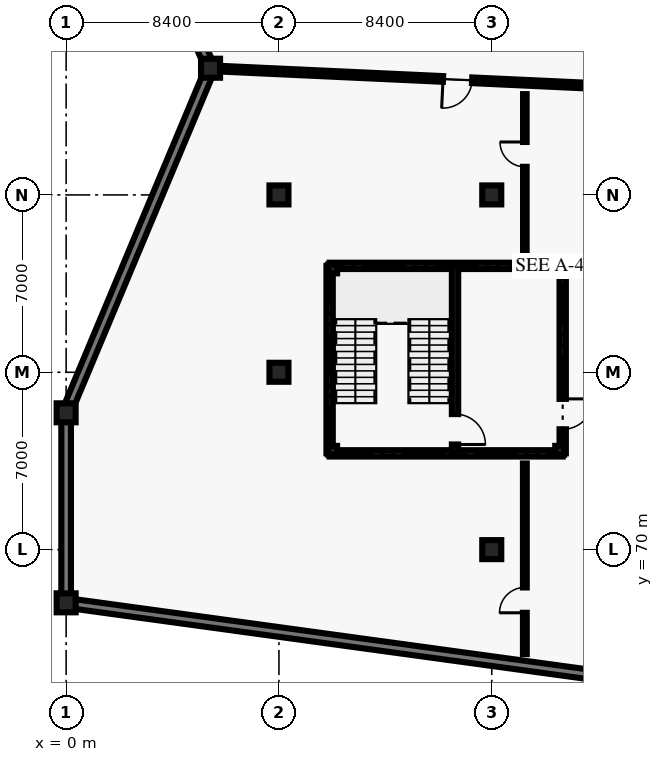
"""IFC4 building model, lengths in metres.
Left out: names, types, materials, properties, quantities, classifications, styles, units other than length and angle.
Written with IfcOpenShell. Run it as: python <this file> out.ifc"""

import sys

from ifc_helpers import new_model, si_unit, direction, frame, frame_2d, origin, origin_2d, place, context, subcontext, project, spatial, rectangle, i_section, extrude, element, fill, save


model = new_model("IFC4")
c1 = context("Model", 3, precision=1e-05, world=origin(), true_north=direction((0.0, 1.0)))
c2 = subcontext(c1, "Body", "Model", "MODEL_VIEW")
j1 = project(units=[si_unit("LENGTHUNIT", "METRE"), si_unit("PLANEANGLEUNIT", "RADIAN")], contexts=[c1])
p1 = place(None, origin())
s1 = spatial("IfcSite", under=j1, at=p1, CompositionType="ELEMENT")
p2 = place(p1, origin())
s2 = spatial("IfcBuilding", under=s1, at=p2, CompositionType="ELEMENT")
p3 = place(p2, frame((0.0, 0.0, -4.5)))
s3 = spatial("IfcBuildingStorey", under=s2, at=p3, CompositionType="ELEMENT", Elevation=-4.5)
for number, where, z_axis, x_axis in (
    (1, (0.0, 67.9, 0.0), (0.0, 0.0, 1.0), (1.0, 0.0, 0.0)),
    (2, (0.0, 75.4, 0.0), (0.0, 0.0, 1.0), (1.0, 0.0, 0.0)),
    (3, (5.7, 89.0, 0.0), (0.0, 0.0, 1.0), (1.0, 0.0, 0.0)),
    (4, (8.4, 77.0, 0.0), (0.0, 0.0, 1.0), (1.0, 0.0, 0.0)),
    (5, (8.4, 84.0, 0.0), (0.0, 0.0, 1.0), (1.0, 0.0, 0.0)),
    (6, (16.8, 70.0, 0.0), (0.0, 0.0, 1.0), (1.0, 0.0, 0.0)),
    (7, (16.8, 84.0, 0.0), (0.0, 0.0, 1.0), (1.0, 0.0, 0.0)),
):
    element("IfcColumn", number, at=place(p3, frame(where, z_axis=z_axis, x_axis=x_axis)), inside=s3, PredefinedType="COLUMN", context=c2, shape_type="SweptSolid", body=[
        extrude(rectangle(XDim=0.75, YDim=0.75, at=origin_2d()), origin(), (0.0, 0.0, 1.0), 4.5),
    ])
for number, where, z_axis, x_axis in (
    (8, (10.52, 73.92, 0.0), (0.0, 0.0, 1.0), (1.0, 0.0, 0.0)),
    (9, (19.48, 73.92, 0.0), (0.0, 0.0, 1.0), (1.0, 0.0, 0.0)),
    (10, (19.48, 81.08, 0.0), (0.0, 0.0, 1.0), (1.0, 0.0, 0.0)),
    (11, (10.52, 81.08, 0.0), (0.0, 0.0, 1.0), (1.0, 0.0, 0.0)),
):
    element("IfcColumn", number, at=place(p3, frame(where, z_axis=z_axis, x_axis=x_axis)), inside=s3, PredefinedType="COLUMN", context=c2, shape_type="SweptSolid", body=[
        extrude(i_section(OverallWidth=0.35, OverallDepth=0.35, WebThickness=0.02, FlangeThickness=0.028, at=origin_2d()), origin(), (0.0, 0.0, 1.0), 4.5),
    ])
p4 = place(p3, frame((0.0, 75.4, 0.0), z_axis=(0.0, 0.0, 1.0), x_axis=(0.0, -1.0, 0.0)))
e12 = element("IfcWall", 12, at=p4, inside=s3, PredefinedType="USERDEFINED", context=c2, shape_type="SweptSolid", body=[
    extrude(rectangle(XDim=7.5, YDim=0.38, at=frame_2d((3.75, 0.0))), origin(), (0.0, 0.0, 1.0), 4.14),
])
p5 = place(p3, frame((0.0, 67.9, 0.0), z_axis=(0.0, 0.0, 1.0), x_axis=(0.990762647393, -0.135607435379, 0.0)))
e13 = element("IfcWall", 13, at=p5, inside=s3, PredefinedType="USERDEFINED", context=c2, shape_type="SweptSolid", body=[
    extrude(rectangle(XDim=26.496, YDim=0.38, at=frame_2d((13.248, 0.0))), origin(), (0.0, 0.0, 1.0), 4.14),
])
p6 = place(p3, frame((5.681, 88.954, 0.0), z_axis=(0.0, 0.0, 1.0), x_axis=(-0.386546655602, -0.922269853699, 0.0)))
e14 = element("IfcWall", 14, at=p6, inside=s3, PredefinedType="USERDEFINED", context=c2, shape_type="SweptSolid", body=[
    extrude(rectangle(XDim=14.697, YDim=0.38, at=frame_2d((7.348, 0.0))), origin(), (0.0, 0.0, 1.0), 4.14),
])
p7 = place(p3, frame((0.0, 101.9, 0.0), z_axis=(0.0, 0.0, 1.0), x_axis=(0.404179059324, -0.914679882803, 0.0)))
e15 = element("IfcWall", 15, at=p7, inside=s3, PredefinedType="USERDEFINED", context=c2, shape_type="SweptSolid", body=[
    extrude(rectangle(XDim=14.053, YDim=0.38, at=frame_2d((7.026, 0.0))), origin(), (0.0, 0.0, 1.0), 4.14),
])
p8 = place(p3, frame((25.2, 88.101, 0.0), z_axis=(0.0, 0.0, 1.0), x_axis=(-0.998939142773, 0.046049853812, 0.0)))
e16 = element("IfcWall", 16, at=p8, inside=s3, PredefinedType="SOLIDWALL", context=c2, shape_type="SweptSolid", body=[
    extrude(rectangle(XDim=19.521, YDim=0.225, at=frame_2d((9.76, 0.0))), origin(), (0.0, 0.0, 1.0), 4.14),
])
p9 = place(p8, frame((9.185, 0.0, 0.0)))
e17 = element("IfcOpeningElement", 17, at=p9, cuts=e16, PredefinedType="OPENING", context=c2, shape_type="SweptSolid", body=[
    extrude(rectangle(XDim=1.15, YDim=2.2, at=frame_2d((0.575, 1.1))), frame((0.0, 0.123, 0.0), z_axis=(0.0, -1.0, 0.0), x_axis=(1.0, 0.0, 0.0)), (0.0, 0.0, 1.0), 0.245),
])
p10 = place(p3, frame((18.106, 65.876, 0.0), z_axis=(0.0, 0.0, 1.0), x_axis=(0.0, 1.0, 0.0)))
e18 = element("IfcWall", 18, at=p10, inside=s3, PredefinedType="PARTITIONING", context=c2, shape_type="SweptSolid", body=[
    extrude(rectangle(XDim=7.524, YDim=0.15, at=frame_2d((3.762, 0.0))), origin(), (0.0, 0.0, 1.0), 3.02),
])
p11 = place(p10, frame((1.631, 0.0, 0.0)))
e19 = element("IfcOpeningElement", 19, at=p11, cuts=e18, PredefinedType="OPENING", context=c2, shape_type="SweptSolid", body=[
    extrude(rectangle(XDim=1.0, YDim=2.15, at=frame_2d((0.5, 1.075))), frame((0.0, 0.085, 0.0), z_axis=(0.0, -1.0, 0.0), x_axis=(1.0, 0.0, 0.0)), (0.0, 0.0, 1.0), 0.17),
])
p12 = place(p3, frame((18.106, 81.6, 0.0), z_axis=(0.0, 0.0, 1.0), x_axis=(0.0, 1.0, 0.0)))
e20 = element("IfcWall", 20, at=p12, inside=s3, PredefinedType="PARTITIONING", context=c2, shape_type="SweptSolid", body=[
    extrude(rectangle(XDim=6.378, YDim=0.14, at=frame_2d((3.189, 0.0))), origin(), (0.0, 0.0, 1.0), 3.02),
])
p13 = place(p12, frame((3.509, 0.0, 0.0)))
e21 = element("IfcOpeningElement", 21, at=p13, cuts=e20, PredefinedType="OPENING", context=c2, shape_type="SweptSolid", body=[
    extrude(rectangle(XDim=0.98, YDim=2.15, at=frame_2d((0.49, 1.075))), frame((0.0, 0.08, 0.0), z_axis=(0.0, -1.0, 0.0), x_axis=(1.0, 0.0, 0.0)), (0.0, 0.0, 1.0), 0.16),
])
p14 = place(p3, frame((10.4, 73.8, 0.0), z_axis=(0.0, 0.0, 1.0), x_axis=(0.0, 1.0, 0.0)))
e22 = element("IfcWall", 22, at=p14, inside=s3, PredefinedType="SHEAR", context=c2, shape_type="SweptSolid", body=[
    extrude(rectangle(XDim=7.4, YDim=0.25, at=frame_2d((3.7, 0.0))), origin(), (0.0, 0.0, 1.0), 4.14),
])
for number, where, z_axis, x_axis in (
    (23, (10.4, 81.2, 0.0), (0.0, 0.0, 1.0), (1.0, 0.0, 0.0)),
    (24, (19.6, 73.8, 0.0), (0.0, 0.0, 1.0), (-1.0, 0.0, 0.0)),
):
    element("IfcWall", number, at=place(p3, frame(where, z_axis=z_axis, x_axis=x_axis)), inside=s3, PredefinedType="SHEAR", context=c2, shape_type="SweptSolid", body=[
        extrude(rectangle(XDim=9.2, YDim=0.25, at=frame_2d((4.6, 0.0))), origin(), (0.0, 0.0, 1.0), 4.14),
    ])
p15 = place(p3, frame((19.6, 81.2, 0.0), z_axis=(0.0, 0.0, 1.0), x_axis=(0.0, -1.0, 0.0)))
e25 = element("IfcWall", 25, at=p15, inside=s3, PredefinedType="SHEAR", context=c2, shape_type="SweptSolid", body=[
    extrude(rectangle(XDim=7.4, YDim=0.25, at=frame_2d((3.7, 0.0))), origin(), (0.0, 0.0, 1.0), 4.14),
])
p16 = place(p15, frame((5.25, 0.0, 0.0)))
e26 = element("IfcOpeningElement", 26, at=p16, cuts=e25, PredefinedType="OPENING", context=c2, shape_type="SweptSolid", body=[
    extrude(rectangle(XDim=1.2, YDim=2.2, at=frame_2d((0.6, 1.1))), frame((0.0, 0.135, 0.0), z_axis=(0.0, -1.0, 0.0), x_axis=(1.0, 0.0, 0.0)), (0.0, 0.0, 1.0), 0.27),
])
p17 = place(p3, frame((15.35, 81.2, 0.0), z_axis=(0.0, 0.0, 1.0), x_axis=(0.0, -1.0, 0.0)))
e27 = element("IfcWall", 27, at=p17, inside=s3, PredefinedType="SHEAR", context=c2, shape_type="SweptSolid", body=[
    extrude(rectangle(XDim=7.4, YDim=0.25, at=frame_2d((3.7, 0.0))), origin(), (0.0, 0.0, 1.0), 4.14),
])
p18 = place(p17, frame((5.85, 0.0, 0.0)))
e28 = element("IfcOpeningElement", 28, at=p18, cuts=e27, PredefinedType="OPENING", context=c2, shape_type="SweptSolid", body=[
    extrude(rectangle(XDim=1.2, YDim=2.2, at=frame_2d((0.6, 1.1))), frame((0.0, 0.135, 0.0), z_axis=(0.0, -1.0, 0.0), x_axis=(1.0, 0.0, 0.0)), (0.0, 0.0, 1.0), 0.27),
])
p19 = place(p9, origin())
e29 = element("IfcDoor", 29, at=p19, inside=s3, OperationType="SINGLE_SWING_RIGHT", PredefinedType="DOOR", context=c2, shape_type="SweptSolid", body=[
    extrude(rectangle(XDim=1.15, YDim=2.2, at=frame_2d((0.575, 1.1))), frame((0.0, 0.025, 0.0), z_axis=(0.0, -1.0, 0.0), x_axis=(1.0, 0.0, 0.0)), (0.0, 0.0, 1.0), 0.05),
])
fill(e17, e29)
p20 = place(p11, origin())
e30 = element("IfcDoor", 30, at=p20, inside=s3, OperationType="SINGLE_SWING_LEFT", PredefinedType="DOOR", context=c2, shape_type="SweptSolid", body=[
    extrude(rectangle(XDim=1.0, YDim=2.15, at=frame_2d((0.5, 1.075))), frame((0.0, 0.025, 0.0), z_axis=(0.0, -1.0, 0.0), x_axis=(1.0, 0.0, 0.0)), (0.0, 0.0, 1.0), 0.05),
])
fill(e19, e30)
p21 = place(p13, origin())
e31 = element("IfcDoor", 31, at=p21, inside=s3, OperationType="SINGLE_SWING_RIGHT", PredefinedType="DOOR", context=c2, shape_type="SweptSolid", body=[
    extrude(rectangle(XDim=0.98, YDim=2.15, at=frame_2d((0.49, 1.075))), frame((0.0, 0.025, 0.0), z_axis=(0.0, -1.0, 0.0), x_axis=(1.0, 0.0, 0.0)), (0.0, 0.0, 1.0), 0.05),
])
fill(e21, e31)
p22 = place(p16, origin())
e32 = element("IfcDoor", 32, at=p22, inside=s3, OperationType="SINGLE_SWING_LEFT", PredefinedType="DOOR", context=c2, shape_type="SweptSolid", body=[
    extrude(rectangle(XDim=1.2, YDim=2.2, at=frame_2d((0.6, 1.1))), frame((0.0, 0.025, 0.0), z_axis=(0.0, -1.0, 0.0), x_axis=(1.0, 0.0, 0.0)), (0.0, 0.0, 1.0), 0.05),
])
fill(e26, e32)
p23 = place(p18, origin())
e33 = element("IfcDoor", 33, at=p23, inside=s3, OperationType="SINGLE_SWING_RIGHT", PredefinedType="DOOR", context=c2, shape_type="SweptSolid", body=[
    extrude(rectangle(XDim=1.2, YDim=2.2, at=frame_2d((0.6, 1.1))), frame((0.0, 0.025, 0.0), z_axis=(0.0, -1.0, 0.0), x_axis=(1.0, 0.0, 0.0)), (0.0, 0.0, 1.0), 0.05),
])
fill(e28, e33)
save(model, sys.argv[1])
